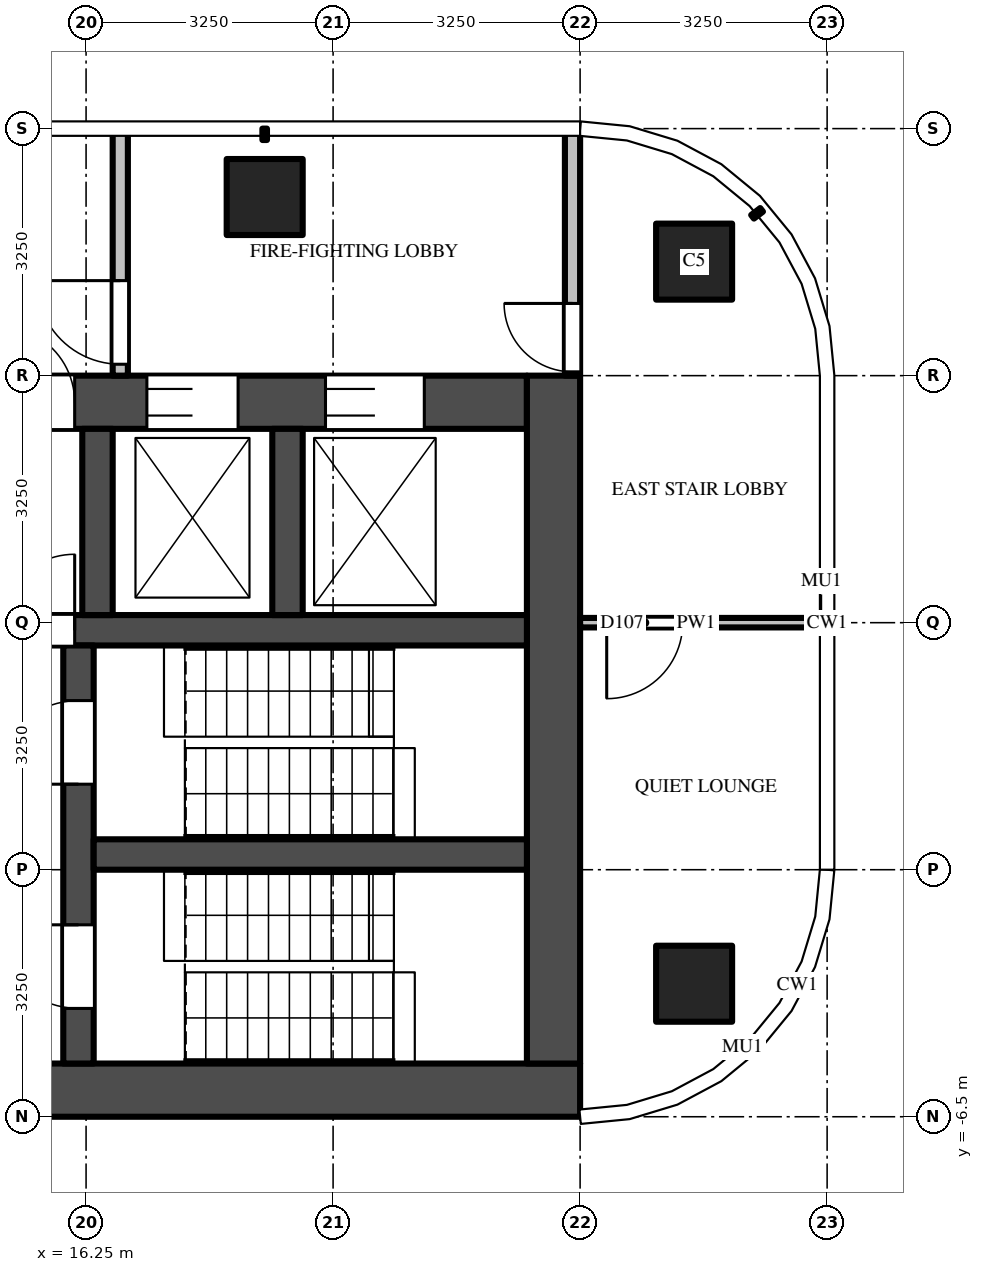
"""IFC4 building model, lengths in metres.
Left out: names, types, materials, properties, quantities, classifications, styles, units other than length and angle.
Written with IfcOpenShell. Run it as: python <this file> out.ifc"""

import sys

from ifc_helpers import new_model, si_unit, direction, frame, frame_2d, origin, origin_2d, place, context, subcontext, project, spatial, rectangle, extrude, source, transform, mapped, element, fill, save


model = new_model("IFC4")
c1 = context("Model", 3, precision=1e-05, world=origin(), true_north=direction((0.0, 1.0)))
c2 = subcontext(c1, "Body", "Model", "MODEL_VIEW")
j1 = project(units=[si_unit("LENGTHUNIT", "METRE"), si_unit("PLANEANGLEUNIT", "RADIAN")], contexts=[c1])
p1 = place(None, origin())
s1 = spatial("IfcSite", under=j1, at=p1, CompositionType="ELEMENT")
p2 = place(p1, origin())
s2 = spatial("IfcBuilding", under=s1, at=p2, CompositionType="ELEMENT")
p3 = place(p2, frame((0.0, 0.0, 287.2)))
s3 = spatial("IfcBuildingStorey", under=s2, at=p3, CompositionType="ELEMENT", Elevation=287.2)
m1 = source(origin(), c2, "Body", "SweptSolid", [
    extrude(rectangle(XDim=1.0, YDim=1.0, at=origin_2d()), origin(), (0.0, 0.0, 1.0), 3.9),
])
for number, where, z_axis, x_axis in (
    (1, (18.6, 5.6, 0.0), (0.0, 0.0, 1.0), (1.0, 0.0, 0.0)),
    (2, (24.25, 4.75, 0.0), (0.0, 0.0, 1.0), (1.0, 0.0, 0.0)),
    (3, (24.25, -4.75, 0.0), (0.0, 0.0, 1.0), (1.0, 0.0, 0.0)),
):
    element("IfcColumn", number, at=place(p3, frame(where, z_axis=z_axis, x_axis=x_axis)), inside=s3, PredefinedType="COLUMN", context=c2, shape_type="MappedRepresentation", body=[
        mapped(m1, transform((0.0, 0.0, 0.0))),
    ])
m2 = source(origin(), c2, "Body", "SweptSolid", [
    extrude(rectangle(XDim=16.65, YDim=0.7, at=frame_2d((8.325, 0.0))), origin(), (0.0, 0.0, 1.0), 3.7),
])
p4 = place(p3, frame((6.1, -6.15, 0.0), z_axis=(0.0, 0.0, 1.0), x_axis=(1.0, 0.0, 0.0)))
e4 = element("IfcWall", 4, at=p4, inside=s3, PredefinedType="SHEAR", context=c2, shape_type="MappedRepresentation", body=[
    mapped(m2, transform((0.0, 0.0, 0.0))),
])
m3 = source(origin(), c2, "Body", "SweptSolid", [
    extrude(rectangle(XDim=14.85, YDim=0.7, at=frame_2d((7.425, 0.0))), origin(), (0.0, 0.0, 1.0), 3.7),
])
p5 = place(p3, frame((7.2, 2.9, 0.0), z_axis=(0.0, 0.0, 1.0), x_axis=(1.0, 0.0, 0.0)))
e5 = element("IfcWall", 5, at=p5, inside=s3, PredefinedType="SHEAR", context=c2, shape_type="MappedRepresentation", body=[
    mapped(m3, transform((0.0, 0.0, 0.0))),
])
m4 = source(origin(), c2, "Body", "SweptSolid", [
    extrude(rectangle(XDim=1.2, YDim=2.1, at=frame_2d((0.6, 1.05))), frame((0.0, 0.36, 0.0), z_axis=(0.0, -1.0, 0.0), x_axis=(1.0, 0.0, 0.0)), (0.0, 0.0, 1.0), 0.72),
])
p6 = place(p5, frame((5.7, 0.0, 0.0)))
e6 = element("IfcOpeningElement", 6, at=p6, cuts=e5, PredefinedType="OPENING", context=c2, shape_type="MappedRepresentation", body=[
    mapped(m4, transform((0.0, 0.0, 0.0))),
])
m5 = source(origin(), c2, "Body", "SweptSolid", [
    extrude(rectangle(XDim=1.3, YDim=2.1, at=frame_2d((0.65, 1.05))), frame((0.0, 0.36, 0.0), z_axis=(0.0, -1.0, 0.0), x_axis=(1.0, 0.0, 0.0)), (0.0, 0.0, 1.0), 0.72),
])
p7 = place(p5, frame((12.2, 0.0, 0.0)))
e7 = element("IfcOpeningElement", 7, at=p7, cuts=e5, PredefinedType="OPENING", context=c2, shape_type="MappedRepresentation", body=[
    mapped(m5, transform((0.0, 0.0, 0.0))),
])
p8 = place(p5, frame((9.85, 0.0, 0.0)))
e8 = element("IfcOpeningElement", 8, at=p8, cuts=e5, PredefinedType="OPENING", context=c2, shape_type="MappedRepresentation", body=[
    mapped(m4, transform((0.0, 0.0, 0.0))),
])
m6 = source(origin(), c2, "Body", "SweptSolid", [
    extrude(rectangle(XDim=1.0, YDim=2.1, at=frame_2d((0.5, 1.05))), frame((0.0, 0.36, 0.0), z_axis=(0.0, -1.0, 0.0), x_axis=(1.0, 0.0, 0.0)), (0.0, 0.0, 1.0), 0.72),
])
p9 = place(p5, frame((7.9, 0.0, 0.0)))
e9 = element("IfcOpeningElement", 9, at=p9, cuts=e5, PredefinedType="OPENING", context=c2, shape_type="MappedRepresentation", body=[
    mapped(m6, transform((0.0, 0.0, 0.0))),
])
m7 = source(origin(), c2, "Body", "SweptSolid", [
    extrude(rectangle(XDim=0.8, YDim=2.1, at=frame_2d((0.4, 1.05))), frame((0.0, 0.36, 0.0), z_axis=(0.0, -1.0, 0.0), x_axis=(1.0, 0.0, 0.0)), (0.0, 0.0, 1.0), 0.72),
])
p10 = place(p5, frame((0.212, 0.0, 0.0)))
e10 = element("IfcOpeningElement", 10, at=p10, cuts=e5, PredefinedType="OPENING", context=c2, shape_type="MappedRepresentation", body=[
    mapped(m7, transform((0.0, 0.0, 0.0))),
])
p11 = place(p5, frame((2.587, 0.0, 0.0)))
e11 = element("IfcOpeningElement", 11, at=p11, cuts=e5, PredefinedType="OPENING", context=c2, shape_type="MappedRepresentation", body=[
    mapped(m6, transform((0.0, 0.0, 0.0))),
])
m8 = source(origin(), c2, "Body", "SweptSolid", [
    extrude(rectangle(XDim=9.05, YDim=0.7, at=frame_2d((4.525, 0.0))), origin(), (0.0, 0.0, 1.0), 3.7),
])
p12 = place(p3, frame((22.4, -5.8, 0.0), z_axis=(0.0, 0.0, 1.0), x_axis=(0.0, 1.0, 0.0)))
e12 = element("IfcWall", 12, at=p12, inside=s3, PredefinedType="SHEAR", context=c2, shape_type="MappedRepresentation", body=[
    mapped(m8, transform((0.0, 0.0, 0.0))),
])
m9 = source(origin(), c2, "Body", "SweptSolid", [
    extrude(rectangle(XDim=14.85, YDim=0.4, at=frame_2d((7.425, 0.0))), origin(), (0.0, 0.0, 1.0), 3.7),
])
p13 = place(p3, frame((7.2, -0.1, 0.0), z_axis=(0.0, 0.0, 1.0), x_axis=(1.0, 0.0, 0.0)))
e13 = element("IfcWall", 13, at=p13, inside=s3, PredefinedType="SHEAR", context=c2, shape_type="MappedRepresentation", body=[
    mapped(m9, transform((0.0, 0.0, 0.0))),
])
m10 = source(origin(), c2, "Body", "SweptSolid", [
    extrude(rectangle(XDim=1.0, YDim=2.1, at=frame_2d((0.5, 1.05))), frame((0.0, 0.21, 0.0), z_axis=(0.0, -1.0, 0.0), x_axis=(1.0, 0.0, 0.0)), (0.0, 0.0, 1.0), 0.42),
])
p14 = place(p13, frame((7.9, 0.0, 0.0)))
e14 = element("IfcOpeningElement", 14, at=p14, cuts=e13, PredefinedType="OPENING", context=c2, shape_type="MappedRepresentation", body=[
    mapped(m10, transform((0.0, 0.0, 0.0))),
])
m11 = source(origin(), c2, "Body", "SweptSolid", [
    extrude(rectangle(XDim=5.5, YDim=0.4, at=frame_2d((2.75, 0.0))), origin(), (0.0, 0.0, 1.0), 3.7),
])
p15 = place(p3, frame((16.15, -5.8, 0.0), z_axis=(0.0, 0.0, 1.0), x_axis=(0.0, 1.0, 0.0)))
e15 = element("IfcWall", 15, at=p15, inside=s3, PredefinedType="SHEAR", context=c2, shape_type="MappedRepresentation", body=[
    mapped(m11, transform((0.0, 0.0, 0.0))),
])
m12 = source(origin(), c2, "Body", "SweptSolid", [
    extrude(rectangle(XDim=1.1, YDim=2.1, at=frame_2d((0.55, 1.05))), frame((0.0, 0.21, 0.0), z_axis=(0.0, -1.0, 0.0), x_axis=(1.0, 0.0, 0.0)), (0.0, 0.0, 1.0), 0.42),
])
p16 = place(p15, frame((0.725, 0.0, 0.0)))
e16 = element("IfcOpeningElement", 16, at=p16, cuts=e15, PredefinedType="OPENING", context=c2, shape_type="MappedRepresentation", body=[
    mapped(m12, transform((0.0, 0.0, 0.0))),
])
p17 = place(p15, frame((3.675, 0.0, 0.0)))
e17 = element("IfcOpeningElement", 17, at=p17, cuts=e15, PredefinedType="OPENING", context=c2, shape_type="MappedRepresentation", body=[
    mapped(m12, transform((0.0, 0.0, 0.0))),
])
m13 = source(origin(), c2, "Body", "SweptSolid", [
    extrude(rectangle(XDim=5.7, YDim=0.4, at=frame_2d((2.85, 0.0))), origin(), (0.0, 0.0, 1.0), 3.7),
])
p18 = place(p3, frame((16.35, -3.05, 0.0), z_axis=(0.0, 0.0, 1.0), x_axis=(1.0, 0.0, 0.0)))
e18 = element("IfcWall", 18, at=p18, inside=s3, PredefinedType="SHEAR", context=c2, shape_type="MappedRepresentation", body=[
    mapped(m13, transform((0.0, 0.0, 0.0))),
])
m14 = source(origin(), c2, "Body", "SweptSolid", [
    extrude(rectangle(XDim=2.45, YDim=0.4, at=frame_2d((1.225, 0.0))), origin(), (0.0, 0.0, 1.0), 3.7),
])
for number, where, z_axis, x_axis in (
    (19, (16.4, 0.1, 0.0), (0.0, 0.0, 1.0), (0.0, 1.0, 0.0)),
    (20, (18.9, 0.1, 0.0), (0.0, 0.0, 1.0), (0.0, 1.0, 0.0)),
):
    element("IfcWall", number, at=place(p3, frame(where, z_axis=z_axis, x_axis=x_axis)), inside=s3, PredefinedType="SHEAR", context=c2, shape_type="MappedRepresentation", body=[
        mapped(m14, transform((0.0, 0.0, 0.0))),
    ])
m15 = source(origin(), c2, "Body", "SweptSolid", [
    extrude(rectangle(XDim=3.25, YDim=0.2, at=frame_2d((1.625, 0.0))), origin(), (0.0, 0.0, 1.0), 3.7),
])
p19 = place(p3, frame((16.7, 3.25, 0.0), z_axis=(0.0, 0.0, 1.0), x_axis=(0.0, 1.0, 0.0)))
e21 = element("IfcWall", 21, at=p19, inside=s3, PredefinedType="PARTITIONING", context=c2, shape_type="MappedRepresentation", body=[
    mapped(m15, transform((0.0, 0.0, 0.0))),
])
m16 = source(origin(), c2, "Body", "SweptSolid", [
    extrude(rectangle(XDim=1.1, YDim=2.1, at=frame_2d((0.55, 1.05))), frame((0.0, 0.11, 0.0), z_axis=(0.0, -1.0, 0.0), x_axis=(1.0, 0.0, 0.0)), (0.0, 0.0, 1.0), 0.22),
])
p20 = place(p19, frame((0.15, 0.0, 0.0)))
e22 = element("IfcOpeningElement", 22, at=p20, cuts=e21, PredefinedType="OPENING", context=c2, shape_type="MappedRepresentation", body=[
    mapped(m16, transform((0.0, 0.0, 0.0))),
])
p21 = place(p3, frame((22.65, 3.25, 0.0), z_axis=(0.0, 0.0, 1.0), x_axis=(0.0, 1.0, 0.0)))
e23 = element("IfcWall", 23, at=p21, inside=s3, PredefinedType="PARTITIONING", context=c2, shape_type="MappedRepresentation", body=[
    mapped(m15, transform((0.0, 0.0, 0.0))),
])
m17 = source(origin(), c2, "Body", "SweptSolid", [
    extrude(rectangle(XDim=0.9, YDim=2.1, at=frame_2d((0.45, 1.05))), frame((0.0, 0.11, 0.0), z_axis=(0.0, -1.0, 0.0), x_axis=(1.0, 0.0, 0.0)), (0.0, 0.0, 1.0), 0.22),
])
p22 = place(p21, frame((0.05, 0.0, 0.0)))
e24 = element("IfcOpeningElement", 24, at=p22, cuts=e23, PredefinedType="OPENING", context=c2, shape_type="MappedRepresentation", body=[
    mapped(m17, transform((0.0, 0.0, 0.0))),
])
m18 = source(origin(), c2, "Body", "SweptSolid", [
    extrude(rectangle(XDim=3.05, YDim=0.125, at=frame_2d((1.525, 0.0))), origin(), (0.0, 0.0, 1.0), 2.78),
])
p23 = place(p3, frame((25.8, 0.0, 0.0), z_axis=(0.0, 0.0, 1.0), x_axis=(-1.0, 0.0, 0.0)))
e25 = element("IfcWall", 25, at=p23, inside=s3, PredefinedType="PARTITIONING", context=c2, shape_type="MappedRepresentation", body=[
    mapped(m18, transform((0.0, 0.0, 0.0))),
])
m19 = source(origin(), c2, "Body", "SweptSolid", [
    extrude(rectangle(XDim=1.0, YDim=2.1, at=frame_2d((0.5, 1.05))), frame((0.0, 0.073, 0.0), z_axis=(0.0, -1.0, 0.0), x_axis=(1.0, 0.0, 0.0)), (0.0, 0.0, 1.0), 0.145),
])
p24 = place(p23, frame((1.7, 0.0, 0.0)))
e26 = element("IfcOpeningElement", 26, at=p24, cuts=e25, PredefinedType="OPENING", context=c2, shape_type="MappedRepresentation", body=[
    mapped(m19, transform((0.0, 0.0, 0.0))),
])
m20 = source(origin(), c2, "Body", "SweptSolid", [
    extrude(rectangle(XDim=1.3, YDim=2.1, at=frame_2d((0.65, 1.05))), frame((0.0, -0.275, 0.0), z_axis=(0.0, -1.0, 0.0), x_axis=(1.0, 0.0, 0.0)), (0.0, 0.0, 1.0), 0.05),
])
p25 = place(p7, origin())
e27 = element("IfcDoor", 27, at=p25, inside=s3, OperationType="DOUBLE_DOOR_SLIDING", PredefinedType="DOOR", context=c2, shape_type="MappedRepresentation", body=[
    mapped(m20, transform((0.0, 0.0, 0.0))),
])
fill(e7, e27)
m21 = source(origin(), c2, "Body", "SweptSolid", [
    extrude(rectangle(XDim=1.2, YDim=2.1, at=frame_2d((0.6, 1.05))), frame((0.0, -0.275, 0.0), z_axis=(0.0, -1.0, 0.0), x_axis=(1.0, 0.0, 0.0)), (0.0, 0.0, 1.0), 0.05),
])
p26 = place(p8, origin())
e28 = element("IfcDoor", 28, at=p26, inside=s3, OperationType="DOUBLE_DOOR_SLIDING", PredefinedType="DOOR", context=c2, shape_type="MappedRepresentation", body=[
    mapped(m21, transform((0.0, 0.0, 0.0))),
])
fill(e8, e28)
m22 = source(origin(), c2, "Body", "SweptSolid", [
    extrude(rectangle(XDim=1.1, YDim=2.1, at=frame_2d((0.55, 1.05))), frame((0.0, 0.025, 0.0), z_axis=(0.0, -1.0, 0.0), x_axis=(1.0, 0.0, 0.0)), (0.0, 0.0, 1.0), 0.05),
])
p27 = place(p16, origin())
e29 = element("IfcDoor", 29, at=p27, inside=s3, OperationType="SINGLE_SWING_RIGHT", PredefinedType="DOOR", context=c2, shape_type="MappedRepresentation", body=[
    mapped(m22, transform((0.0, 0.0, 0.0))),
])
fill(e16, e29)
p28 = place(p17, origin())
e30 = element("IfcDoor", 30, at=p28, inside=s3, OperationType="SINGLE_SWING_LEFT", PredefinedType="DOOR", context=c2, shape_type="MappedRepresentation", body=[
    mapped(m22, transform((0.0, 0.0, 0.0))),
])
fill(e17, e30)
m23 = source(origin(), c2, "Body", "SweptSolid", [
    extrude(rectangle(XDim=1.0, YDim=2.1, at=frame_2d((0.5, 1.05))), frame((0.0, 0.025, 0.0), z_axis=(0.0, -1.0, 0.0), x_axis=(1.0, 0.0, 0.0)), (0.0, 0.0, 1.0), 0.05),
])
p29 = place(p14, origin())
e31 = element("IfcDoor", 31, at=p29, inside=s3, OperationType="SINGLE_SWING_RIGHT", PredefinedType="DOOR", context=c2, shape_type="MappedRepresentation", body=[
    mapped(m23, transform((0.0, 0.0, 0.0))),
])
fill(e14, e31)
m24 = source(origin(), c2, "Body", "SweptSolid", [
    extrude(rectangle(XDim=1.0, YDim=2.1, at=frame_2d((0.5, 1.05))), frame((0.0, -0.275, 0.0), z_axis=(0.0, -1.0, 0.0), x_axis=(1.0, 0.0, 0.0)), (0.0, 0.0, 1.0), 0.05),
])
p30 = place(p9, origin())
e32 = element("IfcDoor", 32, at=p30, inside=s3, OperationType="SINGLE_SWING_LEFT", PredefinedType="DOOR", context=c2, shape_type="MappedRepresentation", body=[
    mapped(m24, transform((0.0, 0.0, 0.0))),
])
fill(e9, e32)
p31 = place(p20, origin())
e33 = element("IfcDoor", 33, at=p31, inside=s3, OperationType="SINGLE_SWING_RIGHT", PredefinedType="DOOR", context=c2, shape_type="MappedRepresentation", body=[
    mapped(m22, transform((0.0, 0.0, 0.0))),
])
fill(e22, e33)
m25 = source(origin(), c2, "Body", "SweptSolid", [
    extrude(rectangle(XDim=0.9, YDim=2.1, at=frame_2d((0.45, 1.05))), frame((0.0, 0.025, 0.0), z_axis=(0.0, -1.0, 0.0), x_axis=(1.0, 0.0, 0.0)), (0.0, 0.0, 1.0), 0.05),
])
p32 = place(p22, origin())
e34 = element("IfcDoor", 34, at=p32, inside=s3, OperationType="SINGLE_SWING_RIGHT", PredefinedType="DOOR", context=c2, shape_type="MappedRepresentation", body=[
    mapped(m25, transform((0.0, 0.0, 0.0))),
])
fill(e24, e34)
p33 = place(p24, origin())
e35 = element("IfcDoor", 35, at=p33, inside=s3, OperationType="SINGLE_SWING_RIGHT", PredefinedType="DOOR", context=c2, shape_type="MappedRepresentation", body=[
    mapped(m23, transform((0.0, 0.0, 0.0))),
])
fill(e26, e35)
save(model, sys.argv[1])
